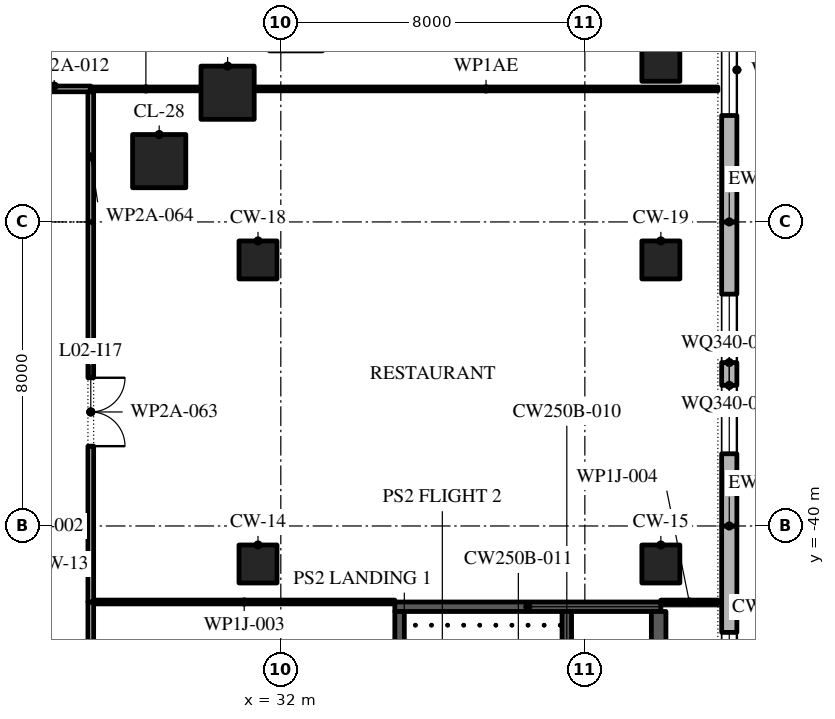
"""IFC4 building model, lengths in metres.
Left out: names, types, materials, properties, quantities, classifications, styles, units other than length and angle.
Written with IfcOpenShell. Run it as: python <this file> out.ifc"""

import sys

from ifc_helpers import new_model, si_unit, direction, frame, frame_2d, origin, origin_2d, place, context, subcontext, project, spatial, polyline, rectangle, outline, extrude, element, fill, save


model = new_model("IFC4")
c1 = context("Model", 3, precision=1e-05, world=origin(), true_north=direction((0.0, 1.0)))
c2 = subcontext(c1, "Body", "Model", "MODEL_VIEW")
j1 = project(units=[si_unit("LENGTHUNIT", "METRE"), si_unit("PLANEANGLEUNIT", "RADIAN")], contexts=[c1])
p1 = place(None, origin())
s1 = spatial("IfcSite", under=j1, at=p1, CompositionType="ELEMENT")
p2 = place(p1, origin())
s2 = spatial("IfcBuilding", under=s1, at=p2, CompositionType="ELEMENT")
p3 = place(p2, frame((0.0, 0.0, 14.0)))
s3 = spatial("IfcBuildingStorey", under=s2, at=p3, CompositionType="ELEMENT", Elevation=14.0)
for number, where, z_axis, x_axis in (
    (1, (31.4, -41.0, 0.0), (0.0, 0.0, 1.0), (1.0, 0.0, 0.0)),
    (2, (42.0, -41.0, 0.0), (0.0, 0.0, 1.0), (1.0, 0.0, 0.0)),
    (3, (31.4, -33.0, 0.0), (0.0, 0.0, 1.0), (1.0, 0.0, 0.0)),
    (4, (42.0, -33.0, 0.0), (0.0, 0.0, 1.0), (1.0, 0.0, 0.0)),
):
    element("IfcColumn", number, at=place(p3, frame(where, z_axis=z_axis, x_axis=x_axis)), inside=s3, PredefinedType="COLUMN", context=c2, shape_type="SweptSolid", body=[
        extrude(rectangle(XDim=1.0, YDim=1.0, at=origin_2d()), origin(), (0.0, 0.0, 1.0), 5.2),
    ])
for number, where, z_axis, x_axis in (
    (5, (28.8, -30.4, 0.0), (0.0, 0.0, 1.0), (1.0, 0.0, 0.0)),
    (6, (30.6, -28.6, 0.0), (0.0, 0.0, 1.0), (1.0, 0.0, 0.0)),
):
    element("IfcColumn", number, at=place(p3, frame(where, z_axis=z_axis, x_axis=x_axis)), inside=s3, PredefinedType="COLUMN", context=c2, shape_type="SweptSolid", body=[
        extrude(rectangle(XDim=1.4, YDim=1.4, at=origin_2d()), origin(), (0.0, 0.0, 1.0), 5.2),
    ])
p4 = place(p3, frame((42.0, -27.8, 0.0), z_axis=(0.0, 0.0, 1.0), x_axis=(1.0, 0.0, 0.0)))
e7 = element("IfcColumn", 7, at=p4, inside=s3, PredefinedType="COLUMN", context=c2, shape_type="SweptSolid", body=[
    extrude(rectangle(XDim=1.0, YDim=1.0, at=origin_2d()), origin(), (0.0, 0.0, 1.0), 5.2),
])
p5 = place(p3, frame((43.8, -48.0, 0.0), z_axis=(0.0, 0.0, 1.0), x_axis=(0.0, 1.0, 0.0)))
e8 = element("IfcWall", 8, at=p5, inside=s3, PredefinedType="STANDARD", context=c2, shape_type="SweptSolid", body=[
    extrude(rectangle(XDim=8.0, YDim=0.4, at=frame_2d((4.0, 0.0))), origin(), (0.0, 0.0, 1.0), 4.9),
])
p6 = place(p5, frame((2.8, 0.0, 0.9)))
e9 = element("IfcOpeningElement", 9, at=p6, cuts=e8, PredefinedType="OPENING", context=c2, shape_type="SweptSolid", body=[
    extrude(outline(polyline([(0.0, 0.0), (2.4, 0.0), (2.4, 1.7), (2.379, 1.976), (2.315, 2.246), (2.212, 2.502), (2.07, 2.74), (1.893, 2.954), (1.686, 3.137), (1.453, 3.287), (1.2, 3.4), (0.947, 3.287), (0.714, 3.137), (0.507, 2.954), (0.33, 2.74), (0.188, 2.502), (0.084, 2.246), (0.021, 1.976), (0.0, 1.7), (0.0, 0.0)])), frame((0.0, 0.21, 0.0), z_axis=(0.0, -1.0, 0.0), x_axis=(1.0, 0.0, 0.0)), (0.0, 0.0, 1.0), 0.42),
])
p7 = place(p3, frame((43.8, -40.0, 0.0), z_axis=(0.0, 0.0, 1.0), x_axis=(0.0, 1.0, 0.0)))
e10 = element("IfcWall", 10, at=p7, inside=s3, PredefinedType="STANDARD", context=c2, shape_type="SweptSolid", body=[
    extrude(rectangle(XDim=8.0, YDim=0.4, at=frame_2d((4.0, 0.0))), origin(), (0.0, 0.0, 1.0), 4.9),
])
p8 = place(p7, frame((1.9, 0.0, 0.9)))
e11 = element("IfcOpeningElement", 11, at=p8, cuts=e10, PredefinedType="OPENING", context=c2, shape_type="SweptSolid", body=[
    extrude(outline(polyline([(0.0, 0.0), (1.8, 0.0), (1.8, 1.841), (1.785, 2.076), (1.739, 2.307), (1.663, 2.53), (1.559, 2.741), (1.428, 2.937), (1.273, 3.114), (1.096, 3.269), (0.9, 3.4), (0.704, 3.269), (0.527, 3.114), (0.372, 2.937), (0.241, 2.741), (0.137, 2.53), (0.061, 2.307), (0.015, 2.076), (0.0, 1.841), (0.0, 0.0)])), frame((0.0, 0.21, 0.0), z_axis=(0.0, -1.0, 0.0), x_axis=(1.0, 0.0, 0.0)), (0.0, 0.0, 1.0), 0.42),
])
p9 = place(p7, frame((4.3, 0.0, 0.9)))
e12 = element("IfcOpeningElement", 12, at=p9, cuts=e10, PredefinedType="OPENING", context=c2, shape_type="SweptSolid", body=[
    extrude(outline(polyline([(0.0, 0.0), (1.8, 0.0), (1.8, 1.841), (1.785, 2.076), (1.739, 2.307), (1.663, 2.53), (1.559, 2.741), (1.428, 2.937), (1.273, 3.114), (1.096, 3.269), (0.9, 3.4), (0.704, 3.269), (0.527, 3.114), (0.372, 2.937), (0.241, 2.741), (0.137, 2.53), (0.061, 2.307), (0.015, 2.076), (0.0, 1.841), (0.0, 0.0)])), frame((0.0, 0.21, 0.0), z_axis=(0.0, -1.0, 0.0), x_axis=(1.0, 0.0, 0.0)), (0.0, 0.0, 1.0), 0.42),
])
p10 = place(p3, frame((43.8, -32.0, 0.0), z_axis=(0.0, 0.0, 1.0), x_axis=(0.0, 1.0, 0.0)))
e13 = element("IfcWall", 13, at=p10, inside=s3, PredefinedType="STANDARD", context=c2, shape_type="SweptSolid", body=[
    extrude(rectangle(XDim=8.0, YDim=0.4, at=frame_2d((4.0, 0.0))), origin(), (0.0, 0.0, 1.0), 4.9),
])
p11 = place(p10, frame((2.8, 0.0, 0.9)))
e14 = element("IfcOpeningElement", 14, at=p11, cuts=e13, PredefinedType="OPENING", context=c2, shape_type="SweptSolid", body=[
    extrude(outline(polyline([(0.0, 0.0), (2.4, 0.0), (2.4, 1.7), (2.379, 1.976), (2.315, 2.246), (2.212, 2.502), (2.07, 2.74), (1.893, 2.954), (1.686, 3.137), (1.453, 3.287), (1.2, 3.4), (0.947, 3.287), (0.714, 3.137), (0.507, 2.954), (0.33, 2.74), (0.188, 2.502), (0.084, 2.246), (0.021, 1.976), (0.0, 1.7), (0.0, 0.0)])), frame((0.0, 0.21, 0.0), z_axis=(0.0, -1.0, 0.0), x_axis=(1.0, 0.0, 0.0)), (0.0, 0.0, 1.0), 0.42),
])
p12 = place(p3, frame((35.0, -42.125, 0.0), z_axis=(0.0, 0.0, 1.0), x_axis=(1.0, 0.0, 0.0)))
e15 = element("IfcWall", 15, at=p12, inside=s3, PredefinedType="SHEAR", context=c2, shape_type="SweptSolid", body=[
    extrude(rectangle(XDim=7.0, YDim=0.25, at=frame_2d((3.5, 0.0))), origin(), (0.0, 0.0, 1.0), 4.9),
])
p13 = place(p3, frame((35.125, -49.75, 0.0), z_axis=(0.0, 0.0, 1.0), x_axis=(0.0, 1.0, 0.0)))
e16 = element("IfcWall", 16, at=p13, inside=s3, PredefinedType="SHEAR", context=c2, shape_type="SweptSolid", body=[
    extrude(rectangle(XDim=7.5, YDim=0.25, at=frame_2d((3.75, 0.0))), origin(), (0.0, 0.0, 1.0), 4.9),
])
p14 = place(p13, frame((0.6, 0.0, 0.0)))
e17 = element("IfcOpeningElement", 17, at=p14, cuts=e16, PredefinedType="OPENING", context=c2, shape_type="SweptSolid", body=[
    extrude(rectangle(XDim=1.2, YDim=2.1, at=frame_2d((0.6, 1.05))), frame((0.0, 0.135, 0.0), z_axis=(0.0, -1.0, 0.0), x_axis=(1.0, 0.0, 0.0)), (0.0, 0.0, 1.0), 0.27),
])
p15 = place(p3, frame((41.942, -49.5, 0.0), z_axis=(0.0, 0.0, 1.0), x_axis=(0.0, 1.0, 0.0)))
e18 = element("IfcWall", 18, at=p15, inside=s3, PredefinedType="SHEAR", context=c2, shape_type="SweptSolid", body=[
    extrude(rectangle(XDim=7.25, YDim=0.384, at=frame_2d((3.625, 0.0))), origin(), (0.0, 0.0, 1.0), 4.9),
])
p16 = place(p15, frame((3.05, 0.0, 0.0)))
e19 = element("IfcOpeningElement", 19, at=p16, cuts=e18, PredefinedType="OPENING", context=c2, shape_type="SweptSolid", body=[
    extrude(rectangle(XDim=0.9, YDim=2.1, at=frame_2d((0.45, 1.05))), frame((0.0, 0.202, 0.0), z_axis=(0.0, -1.0, 0.0), x_axis=(1.0, 0.0, 0.0)), (0.0, 0.0, 1.0), 0.404),
])
p17 = place(p3, frame((39.525, -49.75, 0.0), z_axis=(0.0, 0.0, 1.0), x_axis=(0.0, 1.0, 0.0)))
e20 = element("IfcWall", 20, at=p17, inside=s3, PredefinedType="SHEAR", context=c2, shape_type="SweptSolid", body=[
    extrude(rectangle(XDim=7.5, YDim=0.25, at=frame_2d((3.75, 0.0))), origin(), (0.0, 0.0, 1.0), 4.9),
])
p18 = place(p3, frame((27.075, -42.0, 0.0), z_axis=(0.0, 0.0, 1.0), x_axis=(1.0, 0.0, 0.0)))
e21 = element("IfcWall", 21, at=p18, inside=s3, PredefinedType="PARTITIONING", context=c2, shape_type="SweptSolid", body=[
    extrude(rectangle(XDim=7.925, YDim=0.1, at=frame_2d((3.962, 0.0))), origin(), (0.0, 0.0, 1.0), 4.9),
])
p19 = place(p3, frame((42.0, -42.0, 0.0), z_axis=(0.0, 0.0, 1.0), x_axis=(1.0, 0.0, 0.0)))
e22 = element("IfcWall", 22, at=p19, inside=s3, PredefinedType="PARTITIONING", context=c2, shape_type="SweptSolid", body=[
    extrude(rectangle(XDim=1.5, YDim=0.1, at=frame_2d((0.75, 0.0))), origin(), (0.0, 0.0, 1.0), 4.9),
])
p20 = place(p3, frame((25.075, -28.5, 0.0), z_axis=(0.0, 0.0, 1.0), x_axis=(1.0, 0.0, 0.0)))
e23 = element("IfcWall", 23, at=p20, inside=s3, PredefinedType="PARTITIONING", context=c2, shape_type="SweptSolid", body=[
    extrude(rectangle(XDim=1.925, YDim=0.15, at=frame_2d((0.962, 0.0))), origin(), (0.0, 0.0, 1.0), 4.9),
])
p21 = place(p3, frame((27.0, -28.5, 0.0), z_axis=(0.0, 0.0, 1.0), x_axis=(1.0, 0.0, 0.0)))
e24 = element("IfcWall", 24, at=p21, inside=s3, PredefinedType="PARTITIONING", context=c2, shape_type="SweptSolid", body=[
    extrude(rectangle(XDim=2.9, YDim=0.1, at=frame_2d((1.45, 0.0))), origin(), (0.0, 0.0, 1.0), 4.9),
])
p22 = place(p3, frame((31.3, -28.5, 0.0), z_axis=(0.0, 0.0, 1.0), x_axis=(1.0, 0.0, 0.0)))
e25 = element("IfcWall", 25, at=p22, inside=s3, PredefinedType="PARTITIONING", context=c2, shape_type="SweptSolid", body=[
    extrude(rectangle(XDim=12.2, YDim=0.1, at=frame_2d((6.1, 0.0))), origin(), (0.0, 0.0, 1.0), 4.364),
])
p23 = place(p3, frame((27.0, -48.0, 0.0), z_axis=(0.0, 0.0, 1.0), x_axis=(0.0, 1.0, 0.0)))
e26 = element("IfcWall", 26, at=p23, inside=s3, PredefinedType="PARTITIONING", context=c2, shape_type="SweptSolid", body=[
    extrude(rectangle(XDim=6.0, YDim=0.15, at=frame_2d((3.0, 0.0))), origin(), (0.0, 0.0, 1.0), 4.9),
])
p24 = place(p23, frame((2.5, 0.0, 0.0)))
e27 = element("IfcOpeningElement", 27, at=p24, cuts=e26, PredefinedType="OPENING", context=c2, shape_type="SweptSolid", body=[
    extrude(rectangle(XDim=1.0, YDim=2.1, at=frame_2d((0.5, 1.05))), frame((0.0, 0.085, 0.0), z_axis=(0.0, -1.0, 0.0), x_axis=(1.0, 0.0, 0.0)), (0.0, 0.0, 1.0), 0.17),
])
p25 = place(p3, frame((27.0, -42.0, 0.0), z_axis=(0.0, 0.0, 1.0), x_axis=(0.0, 1.0, 0.0)))
e28 = element("IfcWall", 28, at=p25, inside=s3, PredefinedType="PARTITIONING", context=c2, shape_type="SweptSolid", body=[
    extrude(rectangle(XDim=10.0, YDim=0.15, at=frame_2d((5.0, 0.0))), origin(), (0.0, 0.0, 1.0), 4.9),
])
p26 = place(p25, frame((4.1, 0.0, 0.0)))
e29 = element("IfcOpeningElement", 29, at=p26, cuts=e28, PredefinedType="OPENING", context=c2, shape_type="SweptSolid", body=[
    extrude(rectangle(XDim=1.8, YDim=2.1, at=frame_2d((0.9, 1.05))), frame((0.0, 0.085, 0.0), z_axis=(0.0, -1.0, 0.0), x_axis=(1.0, 0.0, 0.0)), (0.0, 0.0, 1.0), 0.17),
])
p27 = place(p3, frame((27.0, -32.0, 0.0), z_axis=(0.0, 0.0, 1.0), x_axis=(0.0, 1.0, 0.0)))
e30 = element("IfcWall", 30, at=p27, inside=s3, PredefinedType="PARTITIONING", context=c2, shape_type="SweptSolid", body=[
    extrude(rectangle(XDim=3.425, YDim=0.15, at=frame_2d((1.712, 0.0))), origin(), (0.0, 0.0, 1.0), 4.9),
])
p28 = place(p6, origin())
e31 = element("IfcWindow", 31, at=p28, inside=s3, PartitioningType="DOUBLE_PANEL_VERTICAL", PredefinedType="WINDOW", context=c2, shape_type="SweptSolid", body=[
    extrude(outline(polyline([(0.0, 0.0), (2.4, 0.0), (2.4, 1.7), (2.379, 1.976), (2.315, 2.246), (2.212, 2.502), (2.07, 2.74), (1.893, 2.954), (1.686, 3.137), (1.453, 3.287), (1.2, 3.4), (0.947, 3.287), (0.714, 3.137), (0.507, 2.954), (0.33, 2.74), (0.188, 2.502), (0.084, 2.246), (0.021, 1.976), (0.0, 1.7), (0.0, 0.0)])), frame((0.0, 0.03, 0.0), z_axis=(0.0, -1.0, 0.0), x_axis=(1.0, 0.0, 0.0)), (0.0, 0.0, 1.0), 0.06),
])
fill(e9, e31)
p29 = place(p8, origin())
e32 = element("IfcWindow", 32, at=p29, inside=s3, PartitioningType="DOUBLE_PANEL_VERTICAL", PredefinedType="WINDOW", context=c2, shape_type="SweptSolid", body=[
    extrude(outline(polyline([(0.0, 0.0), (1.8, 0.0), (1.8, 1.841), (1.785, 2.076), (1.739, 2.307), (1.663, 2.53), (1.559, 2.741), (1.428, 2.937), (1.273, 3.114), (1.096, 3.269), (0.9, 3.4), (0.704, 3.269), (0.527, 3.114), (0.372, 2.937), (0.241, 2.741), (0.137, 2.53), (0.061, 2.307), (0.015, 2.076), (0.0, 1.841), (0.0, 0.0)])), frame((0.0, 0.03, 0.0), z_axis=(0.0, -1.0, 0.0), x_axis=(1.0, 0.0, 0.0)), (0.0, 0.0, 1.0), 0.06),
])
fill(e11, e32)
p30 = place(p9, origin())
e33 = element("IfcWindow", 33, at=p30, inside=s3, PartitioningType="DOUBLE_PANEL_VERTICAL", PredefinedType="WINDOW", context=c2, shape_type="SweptSolid", body=[
    extrude(outline(polyline([(0.0, 0.0), (1.8, 0.0), (1.8, 1.841), (1.785, 2.076), (1.739, 2.307), (1.663, 2.53), (1.559, 2.741), (1.428, 2.937), (1.273, 3.114), (1.096, 3.269), (0.9, 3.4), (0.704, 3.269), (0.527, 3.114), (0.372, 2.937), (0.241, 2.741), (0.137, 2.53), (0.061, 2.307), (0.015, 2.076), (0.0, 1.841), (0.0, 0.0)])), frame((0.0, 0.03, 0.0), z_axis=(0.0, -1.0, 0.0), x_axis=(1.0, 0.0, 0.0)), (0.0, 0.0, 1.0), 0.06),
])
fill(e12, e33)
p31 = place(p11, origin())
e34 = element("IfcWindow", 34, at=p31, inside=s3, PartitioningType="DOUBLE_PANEL_VERTICAL", PredefinedType="WINDOW", context=c2, shape_type="SweptSolid", body=[
    extrude(outline(polyline([(0.0, 0.0), (2.4, 0.0), (2.4, 1.7), (2.379, 1.976), (2.315, 2.246), (2.212, 2.502), (2.07, 2.74), (1.893, 2.954), (1.686, 3.137), (1.453, 3.287), (1.2, 3.4), (0.947, 3.287), (0.714, 3.137), (0.507, 2.954), (0.33, 2.74), (0.188, 2.502), (0.084, 2.246), (0.021, 1.976), (0.0, 1.7), (0.0, 0.0)])), frame((0.0, 0.03, 0.0), z_axis=(0.0, -1.0, 0.0), x_axis=(1.0, 0.0, 0.0)), (0.0, 0.0, 1.0), 0.06),
])
fill(e14, e34)
p32 = place(p26, frame((1.8, 0.0, 0.0), z_axis=(0.0, 0.0, 1.0), x_axis=(-1.0, 0.0, 0.0)))
e35 = element("IfcDoor", 35, at=p32, inside=s3, OperationType="SINGLE_SWING_RIGHT", PredefinedType="DOOR", context=c2, shape_type="SweptSolid", body=[
    extrude(rectangle(XDim=1.8, YDim=2.1, at=frame_2d((0.9, 1.05))), frame((0.0, 0.025, 0.0), z_axis=(0.0, -1.0, 0.0), x_axis=(1.0, 0.0, 0.0)), (0.0, 0.0, 1.0), 0.05),
])
fill(e29, e35)
save(model, sys.argv[1])
